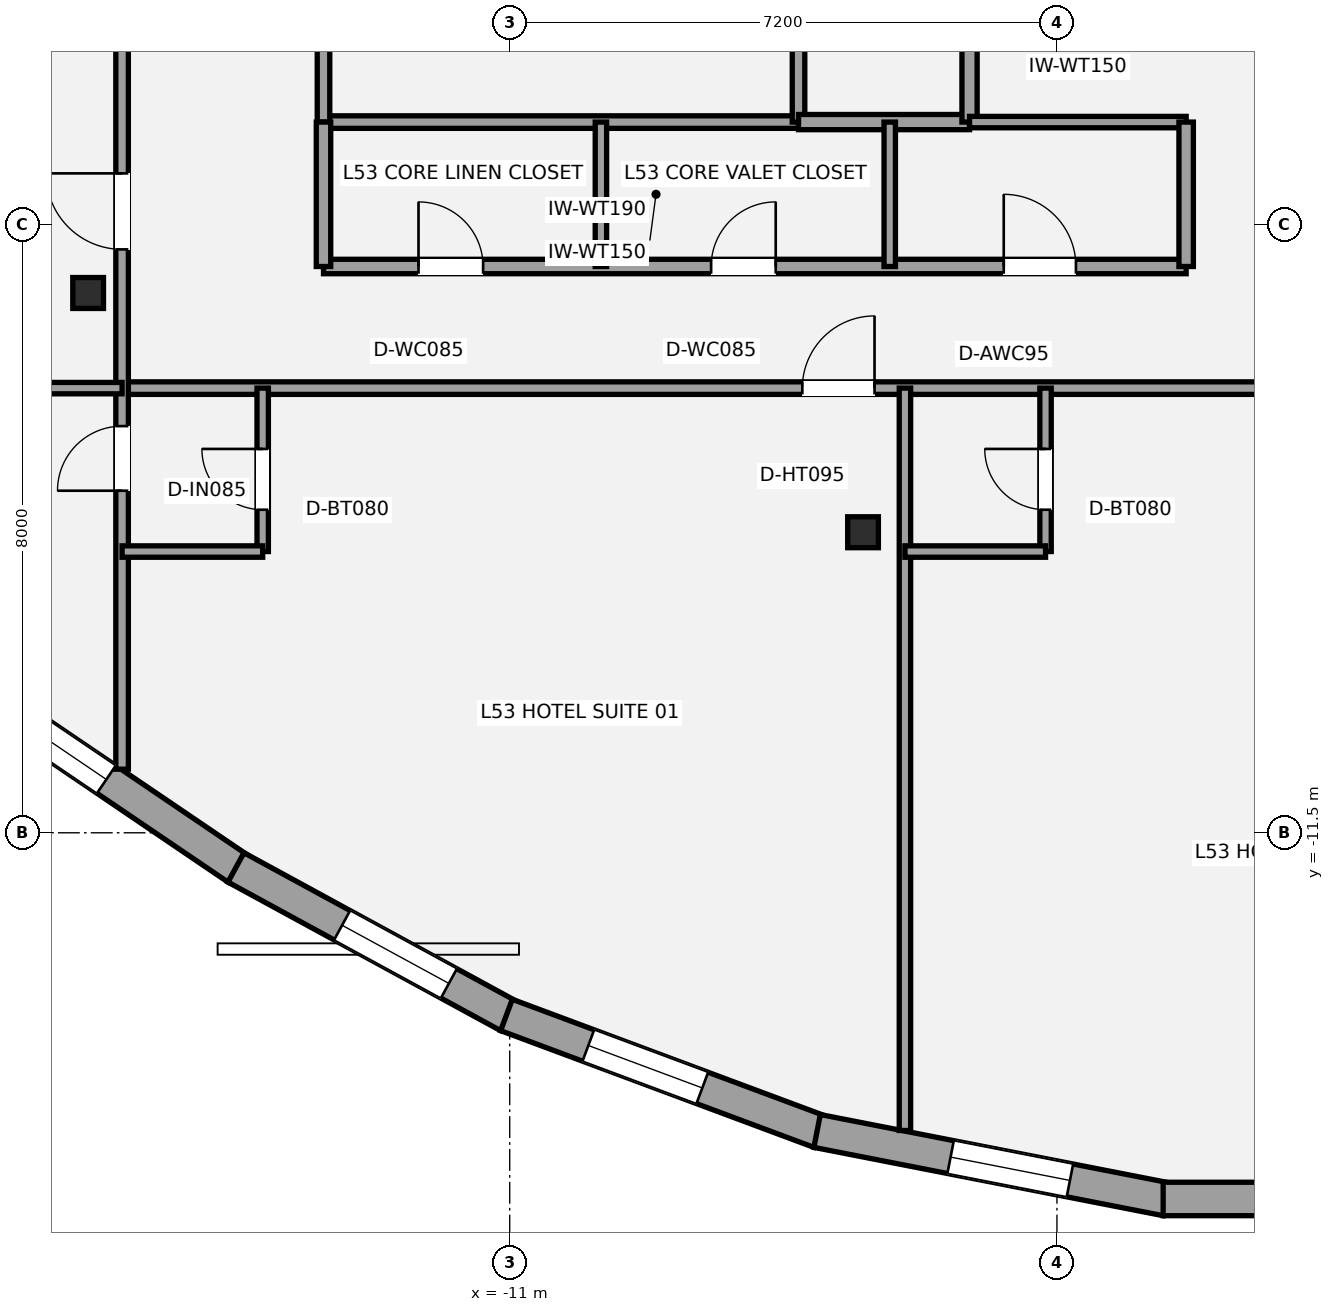
"""IFC4 building model, lengths in metres.
Left out: names, types, materials, properties, quantities, classifications, styles, units other than length and angle.
Written with IfcOpenShell. Run it as: python <this file> out.ifc"""

import sys

from ifc_helpers import new_model, si_unit, direction, frame, frame_2d, origin, origin_2d, place, context, subcontext, project, spatial, rectangle, i_section, extrude, element, fill, save


model = new_model("IFC4")
c1 = context("Model", 3, precision=1e-05, world=origin(), true_north=direction((0.0, 1.0)))
c2 = subcontext(c1, "Body", "Model", "MODEL_VIEW")
j1 = project(units=[si_unit("LENGTHUNIT", "METRE"), si_unit("PLANEANGLEUNIT", "RADIAN")], contexts=[c1])
p1 = place(None, origin())
s1 = spatial("IfcSite", under=j1, at=p1, CompositionType="ELEMENT")
p2 = place(p1, origin())
s2 = spatial("IfcBuilding", under=s1, at=p2, CompositionType="ELEMENT")
p3 = place(p2, frame((0.0, 0.0, 191.8)))
s3 = spatial("IfcBuildingStorey", under=s2, at=p3, CompositionType="ELEMENT", Elevation=191.8)
for number, where, z_axis, x_axis in (
    (1, (-16.547, -4.398, 0.0), (0.0, 0.0, 1.0), (1.0, 0.0, 0.0)),
    (2, (-6.351, -7.546, 0.0), (0.0, 0.0, 1.0), (1.0, 0.0, 0.0)),
):
    element("IfcColumn", number, at=place(p3, frame(where, z_axis=z_axis, x_axis=x_axis)), inside=s3, PredefinedType="COLUMN", context=c2, shape_type="SweptSolid", body=[
        extrude(i_section(OverallWidth=0.404, OverallDepth=0.407, WebThickness=0.027, FlangeThickness=0.044, at=origin_2d()), origin(), (0.0, 0.0, 1.0), 3.2),
    ])
p4 = place(p3, frame((-14.583, -11.967, 0.0), z_axis=(0.0, 0.0, 1.0), x_axis=(-0.827690675663, 0.561184591218, 0.0)))
e3 = element("IfcWall", 3, at=p4, inside=s3, PredefinedType="STANDARD", context=c2, shape_type="SweptSolid", body=[
    extrude(rectangle(XDim=3.882, YDim=0.44, at=frame_2d((1.941, 0.0))), origin(), (0.0, 0.0, 1.0), 2.315),
])
p5 = place(p4, frame((2.083, 0.0, 0.58)))
e4 = element("IfcOpeningElement", 4, at=p5, cuts=e3, PredefinedType="OPENING", context=c2, shape_type="SweptSolid", body=[
    extrude(rectangle(XDim=1.6, YDim=1.55, at=frame_2d((0.8, 0.775))), frame((0.0, 0.23, 0.0), z_axis=(0.0, -1.0, 0.0), x_axis=(1.0, 0.0, 0.0)), (0.0, 0.0, 1.0), 0.46),
])
p6 = place(p3, frame((-11.014, -13.91, 0.0), z_axis=(0.0, 0.0, 1.0), x_axis=(-0.878158075839, 0.478370561217, 0.0)))
e5 = element("IfcWall", 5, at=p6, inside=s3, PredefinedType="STANDARD", context=c2, shape_type="SweptSolid", body=[
    extrude(rectangle(XDim=4.085, YDim=0.44, at=frame_2d((2.043, 0.0))), origin(), (0.0, 0.0, 1.0), 2.315),
])
p7 = place(p6, frame((0.895, 0.0, 0.58)))
e6 = element("IfcOpeningElement", 6, at=p7, cuts=e5, PredefinedType="OPENING", context=c2, shape_type="SweptSolid", body=[
    extrude(rectangle(XDim=1.6, YDim=1.55, at=frame_2d((0.8, 0.775))), frame((0.0, 0.23, 0.0), z_axis=(0.0, -1.0, 0.0), x_axis=(1.0, 0.0, 0.0)), (0.0, 0.0, 1.0), 0.46),
])
p8 = place(p3, frame((-6.921, -15.433, 0.0), z_axis=(0.0, 0.0, 1.0), x_axis=(-0.937088879832, 0.349090863953, 0.0)))
e7 = element("IfcWall", 7, at=p8, inside=s3, PredefinedType="STANDARD", context=c2, shape_type="SweptSolid", body=[
    extrude(rectangle(XDim=4.398, YDim=0.44, at=frame_2d((2.199, 0.0))), origin(), (0.0, 0.0, 1.0), 2.315),
])
p9 = place(p8, frame((1.649, 0.0, 0.58)))
e8 = element("IfcOpeningElement", 8, at=p9, cuts=e7, PredefinedType="OPENING", context=c2, shape_type="SweptSolid", body=[
    extrude(rectangle(XDim=1.6, YDim=1.55, at=frame_2d((0.8, 0.775))), frame((0.0, 0.23, 0.0), z_axis=(0.0, -1.0, 0.0), x_axis=(1.0, 0.0, 0.0)), (0.0, 0.0, 1.0), 0.46),
])
p10 = place(p3, frame((-2.36, -16.322, 0.0), z_axis=(0.0, 0.0, 1.0), x_axis=(-0.981406109785, 0.191942823979, 0.0)))
e9 = element("IfcWall", 9, at=p10, inside=s3, PredefinedType="STANDARD", context=c2, shape_type="SweptSolid", body=[
    extrude(rectangle(XDim=4.682, YDim=0.44, at=frame_2d((2.341, 0.0))), origin(), (0.0, 0.0, 1.0), 2.315),
])
p11 = place(p10, frame((1.293, 0.0, 0.58)))
e10 = element("IfcOpeningElement", 10, at=p11, cuts=e9, PredefinedType="OPENING", context=c2, shape_type="SweptSolid", body=[
    extrude(rectangle(XDim=1.6, YDim=1.55, at=frame_2d((0.8, 0.775))), frame((0.0, 0.23, 0.0), z_axis=(0.0, -1.0, 0.0), x_axis=(1.0, 0.0, 0.0)), (0.0, 0.0, 1.0), 0.46),
])
p12 = place(p3, frame((2.403, -16.318, 0.0), z_axis=(0.0, 0.0, 1.0), x_axis=(-1.0, 0.0, 0.0)))
e11 = element("IfcWall", 11, at=p12, inside=s3, PredefinedType="STANDARD", context=c2, shape_type="SweptSolid", body=[
    extrude(rectangle(XDim=4.805, YDim=0.44, at=frame_2d((2.403, 0.0))), origin(), (0.0, 0.0, 1.0), 2.315),
])
p13 = place(p12, frame((1.775, 0.0, 0.58)))
e12 = element("IfcOpeningElement", 12, at=p13, cuts=e11, PredefinedType="OPENING", context=c2, shape_type="SweptSolid", body=[
    extrude(rectangle(XDim=1.6, YDim=1.55, at=frame_2d((0.8, 0.775))), frame((0.0, 0.23, 0.0), z_axis=(0.0, -1.0, 0.0), x_axis=(1.0, 0.0, 0.0)), (0.0, 0.0, 1.0), 0.46),
])
p14 = place(p3, frame((-13.45, -2.15, 0.0), z_axis=(0.0, 0.0, 1.0), x_axis=(1.0, 0.0, 0.0)))
e13 = element("IfcWall", 13, at=p14, inside=s3, PredefinedType="PARTITIONING", context=c2, shape_type="SweptSolid", body=[
    extrude(rectangle(XDim=6.25, YDim=0.165, at=frame_2d((3.125, 0.0))), origin(), (0.0, 0.0, 1.0), 2.473),
])
p15 = place(p3, frame((-13.45, -2.15, 0.0), z_axis=(0.0, 0.0, 1.0), x_axis=(0.0, 1.0, 0.0)))
e14 = element("IfcWall", 14, at=p15, inside=s3, PredefinedType="PARTITIONING", context=c2, shape_type="SweptSolid", body=[
    extrude(rectangle(XDim=3.4, YDim=0.165, at=frame_2d((1.7, 0.0))), origin(), (0.0, 0.0, 1.0), 2.473),
])
p16 = place(p15, frame((1.15, 0.0, 0.0)))
e15 = element("IfcOpeningElement", 15, at=p16, cuts=e14, PredefinedType="OPENING", context=c2, shape_type="SweptSolid", body=[
    extrude(rectangle(XDim=1.05, YDim=2.15, at=frame_2d((0.525, 1.075))), frame((0.0, 0.093, 0.0), z_axis=(0.0, -1.0, 0.0), x_axis=(1.0, 0.0, 0.0)), (0.0, 0.0, 1.0), 0.185),
])
p17 = place(p3, frame((-7.2, -2.15, 0.0), z_axis=(0.0, 0.0, 1.0), x_axis=(0.0, 1.0, 0.0)))
e16 = element("IfcWall", 16, at=p17, inside=s3, PredefinedType="PARTITIONING", context=c2, shape_type="SweptSolid", body=[
    extrude(rectangle(XDim=3.4, YDim=0.165, at=frame_2d((1.7, 0.0))), origin(), (0.0, 0.0, 1.0), 2.473),
])
p18 = place(p3, frame((-7.2, -2.15, 0.0), z_axis=(0.0, 0.0, 1.0), x_axis=(1.0, 0.0, 0.0)))
e17 = element("IfcWall", 17, at=p18, inside=s3, PredefinedType="SOLIDWALL", context=c2, shape_type="SweptSolid", body=[
    extrude(rectangle(XDim=2.25, YDim=0.2, at=frame_2d((1.125, 0.0))), origin(), (0.0, 0.0, 1.0), 3.02),
])
p19 = place(p3, frame((-4.95, -2.15, 0.0), z_axis=(0.0, 0.0, 1.0), x_axis=(0.0, 1.0, 0.0)))
e18 = element("IfcWall", 18, at=p19, inside=s3, PredefinedType="SOLIDWALL", context=c2, shape_type="SweptSolid", body=[
    extrude(rectangle(XDim=3.4, YDim=0.2, at=frame_2d((1.7, 0.0))), origin(), (0.0, 0.0, 1.0), 2.473),
])
p20 = place(p19, frame((0.95, 0.0, 0.0)))
e19 = element("IfcOpeningElement", 19, at=p20, cuts=e18, PredefinedType="OPENING", context=c2, shape_type="SweptSolid", body=[
    extrude(rectangle(XDim=0.75, YDim=2.1, at=frame_2d((0.375, 1.05))), frame((0.0, 0.11, 0.0), z_axis=(0.0, -1.0, 0.0), x_axis=(1.0, 0.0, 0.0)), (0.0, 0.0, 1.0), 0.22),
])
p21 = place(p3, frame((-13.45, -4.05, 0.0), z_axis=(0.0, 0.0, 1.0), x_axis=(1.0, 0.0, 0.0)))
e20 = element("IfcWall", 20, at=p21, inside=s3, PredefinedType="PLUMBINGWALL", context=c2, shape_type="SweptSolid", body=[
    extrude(rectangle(XDim=11.35, YDim=0.19, at=frame_2d((5.675, 0.0))), origin(), (0.0, 0.0, 1.0), 2.473),
])
p22 = place(p21, frame((1.25, 0.0, 0.0)))
e21 = element("IfcOpeningElement", 21, at=p22, cuts=e20, PredefinedType="OPENING", context=c2, shape_type="SweptSolid", body=[
    extrude(rectangle(XDim=0.85, YDim=2.1, at=frame_2d((0.425, 1.05))), frame((0.0, 0.105, 0.0), z_axis=(0.0, -1.0, 0.0), x_axis=(1.0, 0.0, 0.0)), (0.0, 0.0, 1.0), 0.21),
])
p23 = place(p21, frame((5.1, 0.0, 0.0)))
e22 = element("IfcOpeningElement", 22, at=p23, cuts=e20, PredefinedType="OPENING", context=c2, shape_type="SweptSolid", body=[
    extrude(rectangle(XDim=0.85, YDim=2.1, at=frame_2d((0.425, 1.05))), frame((0.0, 0.105, 0.0), z_axis=(0.0, -1.0, 0.0), x_axis=(1.0, 0.0, 0.0)), (0.0, 0.0, 1.0), 0.21),
])
p24 = place(p21, frame((8.95, 0.0, 0.0)))
e23 = element("IfcOpeningElement", 23, at=p24, cuts=e20, PredefinedType="OPENING", context=c2, shape_type="SweptSolid", body=[
    extrude(rectangle(XDim=0.95, YDim=2.15, at=frame_2d((0.475, 1.075))), frame((0.0, 0.105, 0.0), z_axis=(0.0, -1.0, 0.0), x_axis=(1.0, 0.0, 0.0)), (0.0, 0.0, 1.0), 0.21),
])
p25 = place(p3, frame((-4.95, -2.15, 0.0), z_axis=(0.0, 0.0, 1.0), x_axis=(1.0, 0.0, 0.0)))
e24 = element("IfcWall", 24, at=p25, inside=s3, PredefinedType="PLUMBINGWALL", context=c2, shape_type="SweptSolid", body=[
    extrude(rectangle(XDim=2.85, YDim=0.15, at=frame_2d((1.425, 0.0))), origin(), (0.0, 0.0, 1.0), 3.02),
])
p26 = place(p3, frame((-13.45, -4.05, 0.0), z_axis=(0.0, 0.0, 1.0), x_axis=(0.0, 1.0, 0.0)))
e25 = element("IfcWall", 25, at=p26, inside=s3, PredefinedType="PLUMBINGWALL", context=c2, shape_type="SweptSolid", body=[
    extrude(rectangle(XDim=1.9, YDim=0.19, at=frame_2d((0.95, 0.0))), origin(), (0.0, 0.0, 1.0), 2.473),
])
p27 = place(p3, frame((-2.1, -4.05, 0.0), z_axis=(0.0, 0.0, 1.0), x_axis=(0.0, 1.0, 0.0)))
e26 = element("IfcWall", 26, at=p27, inside=s3, PredefinedType="PLUMBINGWALL", context=c2, shape_type="SweptSolid", body=[
    extrude(rectangle(XDim=1.9, YDim=0.19, at=frame_2d((0.95, 0.0))), origin(), (0.0, 0.0, 1.0), 3.02),
])
for number, where, z_axis, x_axis in (
    (27, (-9.8, -4.05, 0.0), (0.0, 0.0, 1.0), (0.0, 1.0, 0.0)),
    (28, (-6.0, -4.05, 0.0), (0.0, 0.0, 1.0), (0.0, 1.0, 0.0)),
):
    element("IfcWall", number, at=place(p3, frame(where, z_axis=z_axis, x_axis=x_axis)), inside=s3, PredefinedType="PLUMBINGWALL", context=c2, shape_type="SweptSolid", body=[
        extrude(rectangle(XDim=1.9, YDim=0.15, at=frame_2d((0.95, 0.0))), origin(), (0.0, 0.0, 1.0), 2.473),
    ])
p28 = place(p3, frame((-16.1, -5.65, 0.0), z_axis=(0.0, 0.0, 1.0), x_axis=(1.0, 0.0, 0.0)))
e29 = element("IfcWall", 29, at=p28, inside=s3, PredefinedType="PARTITIONING", context=c2, shape_type="SweptSolid", body=[
    extrude(rectangle(XDim=31.65, YDim=0.165, at=frame_2d((15.825, 0.0))), origin(), (0.0, 0.0, 1.0), 2.398),
])
p29 = place(p28, frame((8.95, 0.0, 0.0)))
e30 = element("IfcOpeningElement", 30, at=p29, cuts=e29, PredefinedType="OPENING", context=c2, shape_type="SweptSolid", body=[
    extrude(rectangle(XDim=0.95, YDim=2.15, at=frame_2d((0.475, 1.075))), frame((0.0, 0.093, 0.0), z_axis=(0.0, -1.0, 0.0), x_axis=(1.0, 0.0, 0.0)), (0.0, 0.0, 1.0), 0.185),
])
p30 = place(p28, frame((18.95, 0.0, 0.0)))
e31 = element("IfcOpeningElement", 31, at=p30, cuts=e29, PredefinedType="OPENING", context=c2, shape_type="SweptSolid", body=[
    extrude(rectangle(XDim=0.95, YDim=2.15, at=frame_2d((0.475, 1.075))), frame((0.0, 0.093, 0.0), z_axis=(0.0, -1.0, 0.0), x_axis=(1.0, 0.0, 0.0)), (0.0, 0.0, 1.0), 0.185),
])
p31 = place(p28, frame((30.3, 0.0, 0.0)))
e32 = element("IfcOpeningElement", 32, at=p31, cuts=e29, PredefinedType="OPENING", context=c2, shape_type="SweptSolid", body=[
    extrude(rectangle(XDim=0.95, YDim=2.15, at=frame_2d((0.475, 1.075))), frame((0.0, 0.093, 0.0), z_axis=(0.0, -1.0, 0.0), x_axis=(1.0, 0.0, 0.0)), (0.0, 0.0, 1.0), 0.185),
])
p32 = place(p3, frame((-16.1, -10.663, 0.0), z_axis=(0.0, 0.0, 1.0), x_axis=(0.0, 1.0, 0.0)))
e33 = element("IfcWall", 33, at=p32, inside=s3, PredefinedType="PARTITIONING", context=c2, shape_type="SweptSolid", body=[
    extrude(rectangle(XDim=18.213, YDim=0.165, at=frame_2d((9.107, 0.0))), origin(), (0.0, 0.0, 1.0), 2.473),
])
p33 = place(p32, frame((3.664, 0.0, 0.0)))
e34 = element("IfcOpeningElement", 34, at=p33, cuts=e33, PredefinedType="OPENING", context=c2, shape_type="SweptSolid", body=[
    extrude(rectangle(XDim=0.85, YDim=2.1, at=frame_2d((0.425, 1.05))), frame((0.0, 0.093, 0.0), z_axis=(0.0, -1.0, 0.0), x_axis=(1.0, 0.0, 0.0)), (0.0, 0.0, 1.0), 0.185),
])
p34 = place(p32, frame((6.839, 0.0, 0.0)))
e35 = element("IfcOpeningElement", 35, at=p34, cuts=e33, PredefinedType="OPENING", context=c2, shape_type="SweptSolid", body=[
    extrude(rectangle(XDim=1.0, YDim=2.15, at=frame_2d((0.5, 1.075))), frame((0.0, 0.093, 0.0), z_axis=(0.0, -1.0, 0.0), x_axis=(1.0, 0.0, 0.0)), (0.0, 0.0, 1.0), 0.185),
])
p35 = place(p32, frame((11.264, 0.0, 0.0)))
e36 = element("IfcOpeningElement", 36, at=p35, cuts=e33, PredefinedType="OPENING", context=c2, shape_type="SweptSolid", body=[
    extrude(rectangle(XDim=1.0, YDim=2.15, at=frame_2d((0.5, 1.075))), frame((0.0, 0.093, 0.0), z_axis=(0.0, -1.0, 0.0), x_axis=(1.0, 0.0, 0.0)), (0.0, 0.0, 1.0), 0.185),
])
p36 = place(p32, frame((15.539, 0.0, 0.0)))
e37 = element("IfcOpeningElement", 37, at=p36, cuts=e33, PredefinedType="OPENING", context=c2, shape_type="SweptSolid", body=[
    extrude(rectangle(XDim=1.0, YDim=2.15, at=frame_2d((0.5, 1.075))), frame((0.0, 0.093, 0.0), z_axis=(0.0, -1.0, 0.0), x_axis=(1.0, 0.0, 0.0)), (0.0, 0.0, 1.0), 0.185),
])
p37 = place(p3, frame((-21.757, -5.65, 0.0), z_axis=(0.0, 0.0, 1.0), x_axis=(1.0, 0.0, 0.0)))
e38 = element("IfcWall", 38, at=p37, inside=s3, PredefinedType="PLUMBINGWALL", context=c2, shape_type="SweptSolid", body=[
    extrude(rectangle(XDim=5.657, YDim=0.15, at=frame_2d((2.828, 0.0))), origin(), (0.0, 0.0, 1.0), 2.473),
])
p38 = place(p3, frame((-5.8, -15.417, 0.0), z_axis=(0.0, 0.0, 1.0), x_axis=(0.0, 1.0, 0.0)))
e39 = element("IfcWall", 39, at=p38, inside=s3, PredefinedType="PLUMBINGWALL", context=c2, shape_type="SweptSolid", body=[
    extrude(rectangle(XDim=9.767, YDim=0.15, at=frame_2d((4.883, 0.0))), origin(), (0.0, 0.0, 1.0), 2.473),
])
p39 = place(p3, frame((-14.25, -7.8, 0.0), z_axis=(0.0, 0.0, 1.0), x_axis=(0.0, 1.0, 0.0)))
e40 = element("IfcWall", 40, at=p39, inside=s3, PredefinedType="PLUMBINGWALL", context=c2, shape_type="SweptSolid", body=[
    extrude(rectangle(XDim=2.15, YDim=0.15, at=frame_2d((1.075, 0.0))), origin(), (0.0, 0.0, 1.0), 2.473),
])
p40 = place(p39, frame((0.55, 0.0, 0.0)))
e41 = element("IfcOpeningElement", 41, at=p40, cuts=e40, PredefinedType="OPENING", context=c2, shape_type="SweptSolid", body=[
    extrude(rectangle(XDim=0.8, YDim=2.1, at=frame_2d((0.4, 1.05))), frame((0.0, 0.085, 0.0), z_axis=(0.0, -1.0, 0.0), x_axis=(1.0, 0.0, 0.0)), (0.0, 0.0, 1.0), 0.17),
])
p41 = place(p3, frame((-16.1, -7.8, 0.0), z_axis=(0.0, 0.0, 1.0), x_axis=(1.0, 0.0, 0.0)))
e42 = element("IfcWall", 42, at=p41, inside=s3, PredefinedType="PLUMBINGWALL", context=c2, shape_type="SweptSolid", body=[
    extrude(rectangle(XDim=1.85, YDim=0.15, at=frame_2d((0.925, 0.0))), origin(), (0.0, 0.0, 1.0), 2.473),
])
p42 = place(p3, frame((-3.95, -7.8, 0.0), z_axis=(0.0, 0.0, 1.0), x_axis=(0.0, 1.0, 0.0)))
e43 = element("IfcWall", 43, at=p42, inside=s3, PredefinedType="PLUMBINGWALL", context=c2, shape_type="SweptSolid", body=[
    extrude(rectangle(XDim=2.15, YDim=0.15, at=frame_2d((1.075, 0.0))), origin(), (0.0, 0.0, 1.0), 2.473),
])
p43 = place(p42, frame((0.55, 0.0, 0.0)))
e44 = element("IfcOpeningElement", 44, at=p43, cuts=e43, PredefinedType="OPENING", context=c2, shape_type="SweptSolid", body=[
    extrude(rectangle(XDim=0.8, YDim=2.1, at=frame_2d((0.4, 1.05))), frame((0.0, 0.085, 0.0), z_axis=(0.0, -1.0, 0.0), x_axis=(1.0, 0.0, 0.0)), (0.0, 0.0, 1.0), 0.17),
])
p44 = place(p3, frame((-5.8, -7.8, 0.0), z_axis=(0.0, 0.0, 1.0), x_axis=(1.0, 0.0, 0.0)))
e45 = element("IfcWall", 45, at=p44, inside=s3, PredefinedType="PLUMBINGWALL", context=c2, shape_type="SweptSolid", body=[
    extrude(rectangle(XDim=1.85, YDim=0.15, at=frame_2d((0.925, 0.0))), origin(), (0.0, 0.0, 1.0), 3.02),
])
p45 = place(p5, origin())
e46 = element("IfcWindow", 46, at=p45, inside=s3, PartitioningType="SINGLE_PANEL", PredefinedType="WINDOW", context=c2, shape_type="SweptSolid", body=[
    extrude(rectangle(XDim=1.6, YDim=1.55, at=frame_2d((0.8, 0.775))), frame((0.0, -0.01, 0.0), z_axis=(0.0, -1.0, 0.0), x_axis=(1.0, 0.0, 0.0)), (0.0, 0.0, 1.0), 0.06),
])
fill(e4, e46)
p46 = place(p7, origin())
e47 = element("IfcWindow", 47, at=p46, inside=s3, PartitioningType="SINGLE_PANEL", PredefinedType="WINDOW", context=c2, shape_type="SweptSolid", body=[
    extrude(rectangle(XDim=1.6, YDim=1.55, at=frame_2d((0.8, 0.775))), frame((0.0, -0.01, 0.0), z_axis=(0.0, -1.0, 0.0), x_axis=(1.0, 0.0, 0.0)), (0.0, 0.0, 1.0), 0.06),
])
fill(e6, e47)
p47 = place(p9, origin())
e48 = element("IfcWindow", 48, at=p47, inside=s3, PartitioningType="SINGLE_PANEL", PredefinedType="WINDOW", context=c2, shape_type="SweptSolid", body=[
    extrude(rectangle(XDim=1.6, YDim=1.55, at=frame_2d((0.8, 0.775))), frame((0.0, -0.01, 0.0), z_axis=(0.0, -1.0, 0.0), x_axis=(1.0, 0.0, 0.0)), (0.0, 0.0, 1.0), 0.06),
])
fill(e8, e48)
p48 = place(p11, origin())
e49 = element("IfcWindow", 49, at=p48, inside=s3, PartitioningType="SINGLE_PANEL", PredefinedType="WINDOW", context=c2, shape_type="SweptSolid", body=[
    extrude(rectangle(XDim=1.6, YDim=1.55, at=frame_2d((0.8, 0.775))), frame((0.0, -0.01, 0.0), z_axis=(0.0, -1.0, 0.0), x_axis=(1.0, 0.0, 0.0)), (0.0, 0.0, 1.0), 0.06),
])
fill(e10, e49)
p49 = place(p22, origin())
e50 = element("IfcDoor", 50, at=p49, inside=s3, OperationType="SINGLE_SWING_LEFT", PredefinedType="DOOR", context=c2, shape_type="SweptSolid", body=[
    extrude(rectangle(XDim=0.85, YDim=2.1, at=frame_2d((0.425, 1.05))), frame((0.0, 0.025, 0.0), z_axis=(0.0, -1.0, 0.0), x_axis=(1.0, 0.0, 0.0)), (0.0, 0.0, 1.0), 0.05),
])
fill(e21, e50)
p50 = place(p23, origin())
e51 = element("IfcDoor", 51, at=p50, inside=s3, OperationType="SINGLE_SWING_RIGHT", PredefinedType="DOOR", context=c2, shape_type="SweptSolid", body=[
    extrude(rectangle(XDim=0.85, YDim=2.1, at=frame_2d((0.425, 1.05))), frame((0.0, 0.025, 0.0), z_axis=(0.0, -1.0, 0.0), x_axis=(1.0, 0.0, 0.0)), (0.0, 0.0, 1.0), 0.05),
])
fill(e22, e51)
p51 = place(p24, origin())
e52 = element("IfcDoor", 52, at=p51, inside=s3, OperationType="SINGLE_SWING_LEFT", PredefinedType="DOOR", context=c2, shape_type="SweptSolid", body=[
    extrude(rectangle(XDim=0.95, YDim=2.15, at=frame_2d((0.475, 1.075))), frame((0.0, 0.025, 0.0), z_axis=(0.0, -1.0, 0.0), x_axis=(1.0, 0.0, 0.0)), (0.0, 0.0, 1.0), 0.05),
])
fill(e23, e52)
p52 = place(p33, origin())
e53 = element("IfcDoor", 53, at=p52, inside=s3, OperationType="SINGLE_SWING_LEFT", PredefinedType="DOOR", context=c2, shape_type="SweptSolid", body=[
    extrude(rectangle(XDim=0.85, YDim=2.1, at=frame_2d((0.425, 1.05))), frame((0.0, 0.025, 0.0), z_axis=(0.0, -1.0, 0.0), x_axis=(1.0, 0.0, 0.0)), (0.0, 0.0, 1.0), 0.05),
])
fill(e34, e53)
p53 = place(p29, origin())
e54 = element("IfcDoor", 54, at=p53, inside=s3, OperationType="SINGLE_SWING_RIGHT", PredefinedType="DOOR", context=c2, shape_type="SweptSolid", body=[
    extrude(rectangle(XDim=0.95, YDim=2.15, at=frame_2d((0.475, 1.075))), frame((0.0, 0.025, 0.0), z_axis=(0.0, -1.0, 0.0), x_axis=(1.0, 0.0, 0.0)), (0.0, 0.0, 1.0), 0.05),
])
fill(e30, e54)
p54 = place(p40, origin())
e55 = element("IfcDoor", 55, at=p54, inside=s3, OperationType="SINGLE_SWING_RIGHT", PredefinedType="DOOR", context=c2, shape_type="SweptSolid", body=[
    extrude(rectangle(XDim=0.8, YDim=2.1, at=frame_2d((0.4, 1.05))), frame((0.0, 0.025, 0.0), z_axis=(0.0, -1.0, 0.0), x_axis=(1.0, 0.0, 0.0)), (0.0, 0.0, 1.0), 0.05),
])
fill(e41, e55)
p55 = place(p43, origin())
e56 = element("IfcDoor", 56, at=p55, inside=s3, OperationType="SINGLE_SWING_RIGHT", PredefinedType="DOOR", context=c2, shape_type="SweptSolid", body=[
    extrude(rectangle(XDim=0.8, YDim=2.1, at=frame_2d((0.4, 1.05))), frame((0.0, 0.025, 0.0), z_axis=(0.0, -1.0, 0.0), x_axis=(1.0, 0.0, 0.0)), (0.0, 0.0, 1.0), 0.05),
])
fill(e44, e56)
p56 = place(p34, origin())
e57 = element("IfcDoor", 57, at=p56, inside=s3, OperationType="SINGLE_SWING_RIGHT", PredefinedType="DOOR", context=c2, shape_type="SweptSolid", body=[
    extrude(rectangle(XDim=1.0, YDim=2.15, at=frame_2d((0.5, 1.075))), frame((0.0, 0.025, 0.0), z_axis=(0.0, -1.0, 0.0), x_axis=(1.0, 0.0, 0.0)), (0.0, 0.0, 1.0), 0.05),
])
fill(e35, e57)
save(model, sys.argv[1])
